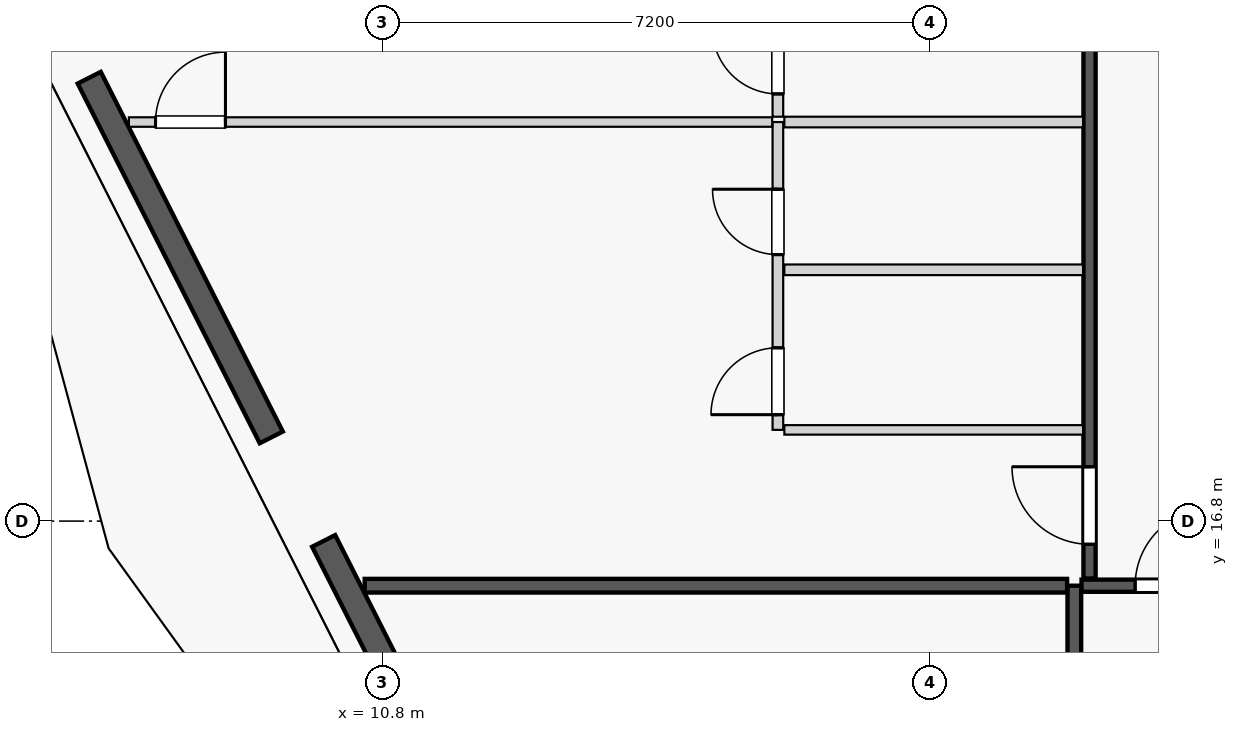
"""IFC4 building model, lengths in metres.
Left out: names, types, materials, properties, quantities, classifications, styles, units other than length and angle.
Written with IfcOpenShell. Run it as: python <this file> out.ifc"""

import sys

from ifc_helpers import new_model, si_unit, direction, frame, frame_2d, origin, origin_2d, place, context, subcontext, project, spatial, rectangle, extrude, element, fill, save


model = new_model("IFC4")
c1 = context("Model", 3, precision=1e-05, world=origin(), true_north=direction((0.0, 1.0)))
c2 = subcontext(c1, "Body", "Model", "MODEL_VIEW")
j1 = project(units=[si_unit("LENGTHUNIT", "METRE"), si_unit("PLANEANGLEUNIT", "RADIAN")], contexts=[c1])
p1 = place(None, origin())
s1 = spatial("IfcSite", under=j1, at=p1, CompositionType="ELEMENT")
p2 = place(p1, origin())
s2 = spatial("IfcBuilding", under=s1, at=p2, CompositionType="ELEMENT")
p3 = place(p2, frame((0.0, 0.0, 35.55)))
s3 = spatial("IfcBuildingStorey", under=s2, at=p3, CompositionType="ELEMENT", Elevation=35.55)
for number, where, z_axis, x_axis in (
    (1, (6.632, 23.314, 0.0), (0.0, 0.0, 1.0), (1.0, 0.0, 0.0)),
    (2, (9.754, 17.22, 0.0), (0.0, 0.0, 1.0), (1.0, 0.0, 0.0)),
):
    element("IfcColumn", number, at=place(p3, frame(where, z_axis=z_axis, x_axis=x_axis)), inside=s3, PredefinedType="COLUMN", context=c2, shape_type="SweptSolid", body=[
        extrude(rectangle(XDim=1.2, YDim=1.2, at=origin_2d()), origin(), (0.0, 0.0, 1.0), 3.55),
    ])
p4 = place(p3, frame((6.94, 22.633, 0.0), z_axis=(0.0, 0.0, 1.0), x_axis=(0.451572088722, -0.892234637686, 0.0)))
e3 = element("IfcWall", 3, at=p4, inside=s3, PredefinedType="STANDARD", context=c2, shape_type="SweptSolid", body=[
    extrude(rectangle(XDim=5.304, YDim=0.34, at=frame_2d((2.652, 0.0))), origin(), (0.0, 0.0, 1.0), 2.787),
])
p5 = place(p4, frame((2.102, 0.0, 0.75)))
e4 = element("IfcOpeningElement", 4, at=p5, cuts=e3, PredefinedType="OPENING", context=c2, shape_type="SweptSolid", body=[
    extrude(rectangle(XDim=1.1, YDim=1.887, at=frame_2d((0.55, 0.943))), frame((0.0, 0.18, 0.0), z_axis=(0.0, -1.0, 0.0), x_axis=(1.0, 0.0, 0.0)), (0.0, 0.0, 1.0), 0.36),
])
p6 = place(p3, frame((10.024, 16.539, 0.0), z_axis=(0.0, 0.0, 1.0), x_axis=(0.451627137896, -0.892206774417, 0.0)))
e5 = element("IfcWall", 5, at=p6, inside=s3, PredefinedType="STANDARD", context=c2, shape_type="SweptSolid", body=[
    extrude(rectangle(XDim=5.547, YDim=0.34, at=frame_2d((2.773, 0.0))), origin(), (0.0, 0.0, 1.0), 2.787),
])
p7 = place(p6, frame((2.679, 0.0, 0.0)))
e6 = element("IfcOpeningElement", 6, at=p7, cuts=e5, PredefinedType="OPENING", context=c2, shape_type="SweptSolid", body=[
    extrude(rectangle(XDim=1.1, YDim=2.25, at=frame_2d((0.55, 1.125))), frame((0.0, 0.18, 0.0), z_axis=(0.0, -1.0, 0.0), x_axis=(1.0, 0.0, 0.0)), (0.0, 0.0, 1.0), 0.36),
])
p8 = place(p3, frame((19.9, 2.455, 0.0), z_axis=(0.0, 0.0, 1.0), x_axis=(0.0, 1.0, 0.0)))
e7 = element("IfcWall", 7, at=p8, inside=s3, PredefinedType="PARTITIONING", context=c2, shape_type="SweptSolid", body=[
    extrude(rectangle(XDim=13.495, YDim=0.18, at=frame_2d((6.748, 0.0))), origin(), (0.0, 0.0, 1.0), 3.33),
])
p9 = place(p3, frame((19.995, 15.95, 0.0), z_axis=(0.0, 0.0, 1.0), x_axis=(1.0, 0.0, 0.0)))
e8 = element("IfcWall", 8, at=p9, inside=s3, PredefinedType="PARTITIONING", context=c2, shape_type="SweptSolid", body=[
    extrude(rectangle(XDim=8.188, YDim=0.16, at=frame_2d((4.094, 0.0))), origin(), (0.0, 0.0, 1.0), 3.33),
])
p10 = place(p9, frame((0.705, 0.0, 0.0)))
e9 = element("IfcOpeningElement", 9, at=p10, cuts=e8, PredefinedType="OPENING", context=c2, shape_type="SweptSolid", body=[
    extrude(rectangle(XDim=1.02, YDim=2.25, at=frame_2d((0.51, 1.125))), frame((0.0, 0.09, 0.0), z_axis=(0.0, -1.0, 0.0), x_axis=(1.0, 0.0, 0.0)), (0.0, 0.0, 1.0), 0.18),
])
p11 = place(p3, frame((10.564, 15.95, 0.0), z_axis=(0.0, 0.0, 1.0), x_axis=(1.0, 0.0, 0.0)))
e10 = element("IfcWall", 10, at=p11, inside=s3, PredefinedType="PARTITIONING", context=c2, shape_type="SweptSolid", body=[
    extrude(rectangle(XDim=9.241, YDim=0.18, at=frame_2d((4.621, 0.0))), origin(), (0.0, 0.0, 1.0), 3.33),
])
p12 = place(p3, frame((20.1, 16.045, 0.0), z_axis=(0.0, 0.0, 1.0), x_axis=(0.0, 1.0, 0.0)))
e11 = element("IfcWall", 11, at=p12, inside=s3, PredefinedType="PARTITIONING", context=c2, shape_type="SweptSolid", body=[
    extrude(rectangle(XDim=9.76, YDim=0.16, at=frame_2d((4.88, 0.0))), origin(), (0.0, 0.0, 1.0), 2.7),
])
p13 = place(p12, frame((0.45, 0.0, 0.0)))
e12 = element("IfcOpeningElement", 12, at=p13, cuts=e11, PredefinedType="OPENING", context=c2, shape_type="SweptSolid", body=[
    extrude(rectangle(XDim=1.02, YDim=2.25, at=frame_2d((0.51, 1.125))), frame((0.0, 0.09, 0.0), z_axis=(0.0, -1.0, 0.0), x_axis=(1.0, 0.0, 0.0)), (0.0, 0.0, 1.0), 0.18),
])
p14 = place(p3, frame((16.085, 18.0, 0.0), z_axis=(0.0, 0.0, 1.0), x_axis=(1.0, 0.0, 0.0)))
e13 = element("IfcWall", 13, at=p14, inside=s3, PredefinedType="PARTITIONING", context=c2, shape_type="SweptSolid", body=[
    extrude(rectangle(XDim=3.93, YDim=0.125, at=frame_2d((1.965, 0.0))), origin(), (0.0, 0.0, 1.0), 2.7),
])
p15 = place(p3, frame((16.0, 18.0, 0.0), z_axis=(0.0, 0.0, 1.0), x_axis=(0.0, 1.0, 0.0)))
e14 = element("IfcWall", 14, at=p15, inside=s3, PredefinedType="PLUMBINGWALL", context=c2, shape_type="SweptSolid", body=[
    extrude(rectangle(XDim=4.05, YDim=0.14, at=frame_2d((2.025, 0.0))), origin(), (0.0, 0.0, 1.0), 3.33),
])
p16 = place(p15, frame((0.2, 0.0, 0.0)))
e15 = element("IfcOpeningElement", 15, at=p16, cuts=e14, PredefinedType="OPENING", context=c2, shape_type="SweptSolid", body=[
    extrude(rectangle(XDim=0.88, YDim=2.15, at=frame_2d((0.44, 1.075))), frame((0.0, 0.08, 0.0), z_axis=(0.0, -1.0, 0.0), x_axis=(1.0, 0.0, 0.0)), (0.0, 0.0, 1.0), 0.16),
])
p17 = place(p15, frame((2.306, 0.0, 0.0)))
e16 = element("IfcOpeningElement", 16, at=p17, cuts=e14, PredefinedType="OPENING", context=c2, shape_type="SweptSolid", body=[
    extrude(rectangle(XDim=0.86, YDim=2.1, at=frame_2d((0.43, 1.05))), frame((0.0, 0.08, 0.0), z_axis=(0.0, -1.0, 0.0), x_axis=(1.0, 0.0, 0.0)), (0.0, 0.0, 1.0), 0.16),
])
p18 = place(p3, frame((16.0, 22.12, 0.0), z_axis=(0.0, 0.0, 1.0), x_axis=(0.0, 1.0, 0.0)))
e17 = element("IfcWall", 17, at=p18, inside=s3, PredefinedType="PLUMBINGWALL", context=c2, shape_type="SweptSolid", body=[
    extrude(rectangle(XDim=3.685, YDim=0.14, at=frame_2d((1.842, 0.0))), origin(), (0.0, 0.0, 1.0), 3.33),
])
p19 = place(p18, frame((0.3, 0.0, 0.0)))
e18 = element("IfcOpeningElement", 18, at=p19, cuts=e17, PredefinedType="OPENING", context=c2, shape_type="SweptSolid", body=[
    extrude(rectangle(XDim=0.86, YDim=2.1, at=frame_2d((0.43, 1.05))), frame((0.0, 0.08, 0.0), z_axis=(0.0, -1.0, 0.0), x_axis=(1.0, 0.0, 0.0)), (0.0, 0.0, 1.0), 0.16),
])
p20 = place(p3, frame((16.085, 22.05, 0.0), z_axis=(0.0, 0.0, 1.0), x_axis=(1.0, 0.0, 0.0)))
e19 = element("IfcWall", 19, at=p20, inside=s3, PredefinedType="PLUMBINGWALL", context=c2, shape_type="SweptSolid", body=[
    extrude(rectangle(XDim=3.93, YDim=0.14, at=frame_2d((1.965, 0.0))), origin(), (0.0, 0.0, 1.0), 3.33),
])
p21 = place(p3, frame((7.462, 22.05, 0.0), z_axis=(0.0, 0.0, 1.0), x_axis=(1.0, 0.0, 0.0)))
e20 = element("IfcWall", 20, at=p21, inside=s3, PredefinedType="PARTITIONING", context=c2, shape_type="SweptSolid", body=[
    extrude(rectangle(XDim=8.463, YDim=0.125, at=frame_2d((4.231, 0.0))), origin(), (0.0, 0.0, 1.0), 3.33),
])
p22 = place(p21, frame((0.35, 0.0, 0.0)))
e21 = element("IfcOpeningElement", 21, at=p22, cuts=e20, PredefinedType="OPENING", context=c2, shape_type="SweptSolid", body=[
    extrude(rectangle(XDim=0.92, YDim=2.15, at=frame_2d((0.46, 1.075))), frame((0.0, 0.073, 0.0), z_axis=(0.0, -1.0, 0.0), x_axis=(1.0, 0.0, 0.0)), (0.0, 0.0, 1.0), 0.145),
])
p23 = place(p3, frame((16.085, 20.106, 0.0), z_axis=(0.0, 0.0, 1.0), x_axis=(1.0, 0.0, 0.0)))
e22 = element("IfcWall", 22, at=p23, inside=s3, PredefinedType="PLUMBINGWALL", context=c2, shape_type="SweptSolid", body=[
    extrude(rectangle(XDim=3.93, YDim=0.14, at=frame_2d((1.965, 0.0))), origin(), (0.0, 0.0, 1.0), 3.33),
])
p24 = place(p5, origin())
e23 = element("IfcWindow", 23, at=p24, inside=s3, PartitioningType="SINGLE_PANEL", PredefinedType="WINDOW", context=c2, shape_type="SweptSolid", body=[
    extrude(rectangle(XDim=1.1, YDim=1.887, at=frame_2d((0.55, 0.943))), frame((0.0, 0.03, 0.0), z_axis=(0.0, -1.0, 0.0), x_axis=(1.0, 0.0, 0.0)), (0.0, 0.0, 1.0), 0.06),
])
fill(e4, e23)
p25 = place(p10, origin())
e24 = element("IfcDoor", 24, at=p25, inside=s3, OperationType="SINGLE_SWING_RIGHT", PredefinedType="DOOR", context=c2, shape_type="SweptSolid", body=[
    extrude(rectangle(XDim=1.02, YDim=2.25, at=frame_2d((0.51, 1.125))), frame((0.0, 0.025, 0.0), z_axis=(0.0, -1.0, 0.0), x_axis=(1.0, 0.0, 0.0)), (0.0, 0.0, 1.0), 0.05),
])
fill(e9, e24)
p26 = place(p16, origin())
e25 = element("IfcDoor", 25, at=p26, inside=s3, OperationType="SINGLE_SWING_LEFT", PredefinedType="DOOR", context=c2, shape_type="SweptSolid", body=[
    extrude(rectangle(XDim=0.88, YDim=2.15, at=frame_2d((0.44, 1.075))), frame((0.0, 0.025, 0.0), z_axis=(0.0, -1.0, 0.0), x_axis=(1.0, 0.0, 0.0)), (0.0, 0.0, 1.0), 0.05),
])
fill(e15, e25)
p27 = place(p17, origin())
e26 = element("IfcDoor", 26, at=p27, inside=s3, OperationType="SINGLE_SWING_RIGHT", PredefinedType="DOOR", context=c2, shape_type="SweptSolid", body=[
    extrude(rectangle(XDim=0.86, YDim=2.1, at=frame_2d((0.43, 1.05))), frame((0.0, 0.025, 0.0), z_axis=(0.0, -1.0, 0.0), x_axis=(1.0, 0.0, 0.0)), (0.0, 0.0, 1.0), 0.05),
])
fill(e16, e26)
p28 = place(p19, origin())
e27 = element("IfcDoor", 27, at=p28, inside=s3, OperationType="SINGLE_SWING_RIGHT", PredefinedType="DOOR", context=c2, shape_type="SweptSolid", body=[
    extrude(rectangle(XDim=0.86, YDim=2.1, at=frame_2d((0.43, 1.05))), frame((0.0, 0.025, 0.0), z_axis=(0.0, -1.0, 0.0), x_axis=(1.0, 0.0, 0.0)), (0.0, 0.0, 1.0), 0.05),
])
fill(e18, e27)
p29 = place(p13, origin())
e28 = element("IfcDoor", 28, at=p29, inside=s3, OperationType="SINGLE_SWING_RIGHT", PredefinedType="DOOR", context=c2, shape_type="SweptSolid", body=[
    extrude(rectangle(XDim=1.02, YDim=2.25, at=frame_2d((0.51, 1.125))), frame((0.0, 0.025, 0.0), z_axis=(0.0, -1.0, 0.0), x_axis=(1.0, 0.0, 0.0)), (0.0, 0.0, 1.0), 0.05),
])
fill(e12, e28)
p30 = place(p22, origin())
e29 = element("IfcDoor", 29, at=p30, inside=s3, OperationType="SINGLE_SWING_RIGHT", PredefinedType="DOOR", context=c2, shape_type="SweptSolid", body=[
    extrude(rectangle(XDim=0.92, YDim=2.15, at=frame_2d((0.46, 1.075))), frame((0.0, 0.025, 0.0), z_axis=(0.0, -1.0, 0.0), x_axis=(1.0, 0.0, 0.0)), (0.0, 0.0, 1.0), 0.05),
])
fill(e21, e29)
save(model, sys.argv[1])
